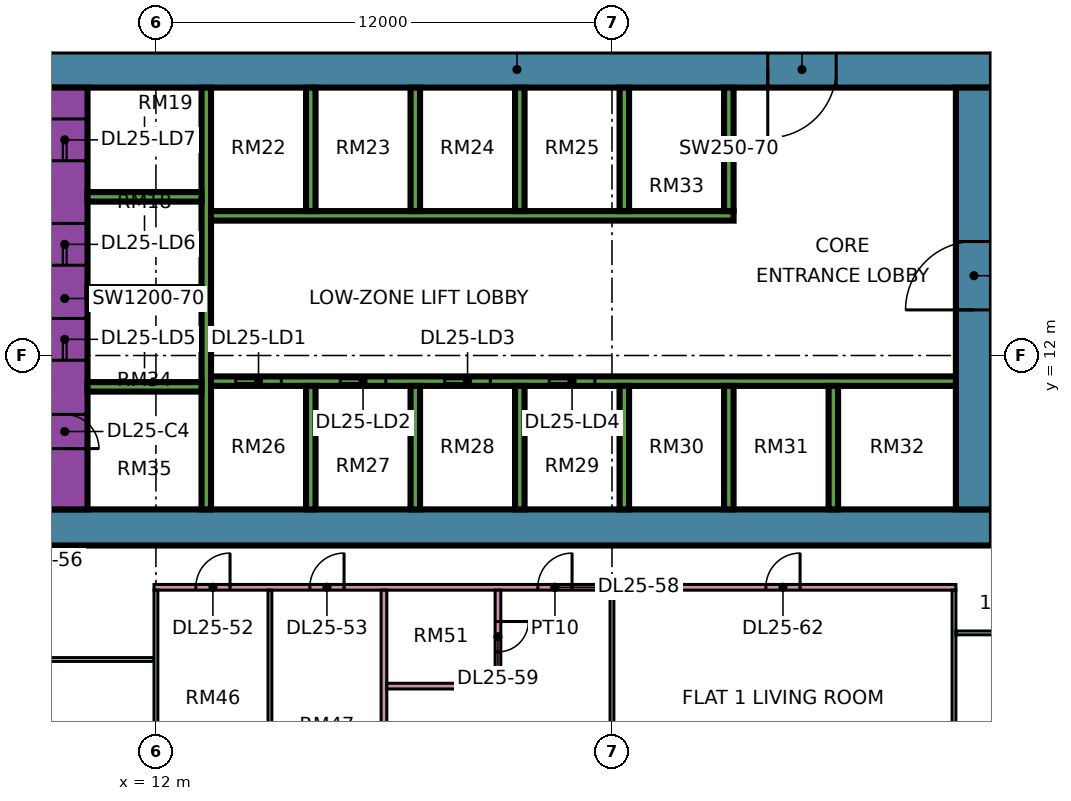
"""IFC4 building model, lengths in metres.
Left out: names, types, materials, properties, quantities, classifications, styles, units other than length and angle.
Written with IfcOpenShell. Run it as: python <this file> out.ifc"""

import sys

from ifc_helpers import new_model, si_unit, direction, frame, frame_2d, origin, place, context, subcontext, project, spatial, rectangle, extrude, element, fill, save


model = new_model("IFC4")
c1 = context("Model", 3, precision=1e-05, world=origin(), true_north=direction((0.0, 1.0)))
c2 = subcontext(c1, "Body", "Model", "MODEL_VIEW")
j1 = project(units=[si_unit("LENGTHUNIT", "METRE"), si_unit("PLANEANGLEUNIT", "RADIAN")], contexts=[c1])
p1 = place(None, origin())
s1 = spatial("IfcSite", under=j1, at=p1, CompositionType="ELEMENT")
p2 = place(p1, origin())
s2 = spatial("IfcBuilding", under=s1, at=p2, CompositionType="ELEMENT")
p3 = place(p2, frame((0.0, 0.0, 110.65)))
s3 = spatial("IfcBuildingStorey", under=s2, at=p3, CompositionType="ELEMENT", Elevation=110.65)
p4 = place(p3, frame((9.0, 7.475, 0.0), z_axis=(0.0, 0.0, 1.0), x_axis=(1.0, 0.0, 0.0)))
e1 = element("IfcWall", 1, at=p4, inside=s3, PredefinedType="SHEAR", context=c2, shape_type="SweptSolid", body=[
    extrude(rectangle(XDim=25.0, YDim=0.95, at=frame_2d((12.5, 0.0))), origin(), (0.0, 0.0, 1.0), 3.75),
])
p5 = place(p3, frame((9.0, 19.525, 0.0), z_axis=(0.0, 0.0, 1.0), x_axis=(1.0, 0.0, 0.0)))
e2 = element("IfcWall", 2, at=p5, inside=s3, PredefinedType="SHEAR", context=c2, shape_type="SweptSolid", body=[
    extrude(rectangle(XDim=25.0, YDim=0.95, at=frame_2d((12.5, 0.0))), origin(), (0.0, 0.0, 1.0), 3.75),
])
p6 = place(p5, frame((19.1, 0.0, 0.0)))
e3 = element("IfcOpeningElement", 3, at=p6, cuts=e2, PredefinedType="OPENING", context=c2, shape_type="SweptSolid", body=[
    extrude(rectangle(XDim=1.8, YDim=2.4, at=frame_2d((0.9, 1.2))), frame((0.0, 0.485, 0.0), z_axis=(0.0, -1.0, 0.0), x_axis=(1.0, 0.0, 0.0)), (0.0, 0.0, 1.0), 0.97),
])
p7 = place(p3, frame((9.6, 7.95, 0.0), z_axis=(0.0, 0.0, 1.0), x_axis=(0.0, 1.0, 0.0)))
e4 = element("IfcWall", 4, at=p7, inside=s3, PredefinedType="SHEAR", context=c2, shape_type="SweptSolid", body=[
    extrude(rectangle(XDim=11.1, YDim=1.2, at=frame_2d((5.55, 0.0))), origin(), (0.0, 0.0, 1.0), 3.75),
])
p8 = place(p7, frame((3.925, 0.0, 0.0)))
e5 = element("IfcOpeningElement", 5, at=p8, cuts=e4, PredefinedType="OPENING", context=c2, shape_type="SweptSolid", body=[
    extrude(rectangle(XDim=1.1, YDim=2.2, at=frame_2d((0.55, 1.1))), frame((0.0, 0.61, 0.0), z_axis=(0.0, -1.0, 0.0), x_axis=(1.0, 0.0, 0.0)), (0.0, 0.0, 1.0), 1.22),
])
p9 = place(p7, frame((6.425, 0.0, 0.0)))
e6 = element("IfcOpeningElement", 6, at=p9, cuts=e4, PredefinedType="OPENING", context=c2, shape_type="SweptSolid", body=[
    extrude(rectangle(XDim=1.1, YDim=2.2, at=frame_2d((0.55, 1.1))), frame((0.0, 0.61, 0.0), z_axis=(0.0, -1.0, 0.0), x_axis=(1.0, 0.0, 0.0)), (0.0, 0.0, 1.0), 1.22),
])
p10 = place(p7, frame((9.175, 0.0, 0.0)))
e7 = element("IfcOpeningElement", 7, at=p10, cuts=e4, PredefinedType="OPENING", context=c2, shape_type="SweptSolid", body=[
    extrude(rectangle(XDim=1.1, YDim=2.2, at=frame_2d((0.55, 1.1))), frame((0.0, 0.61, 0.0), z_axis=(0.0, -1.0, 0.0), x_axis=(1.0, 0.0, 0.0)), (0.0, 0.0, 1.0), 1.22),
])
p11 = place(p7, frame((1.6, 0.0, 0.0)))
e8 = element("IfcOpeningElement", 8, at=p11, cuts=e4, PredefinedType="OPENING", context=c2, shape_type="SweptSolid", body=[
    extrude(rectangle(XDim=0.9, YDim=2.1, at=frame_2d((0.45, 1.05))), frame((0.0, 0.61, 0.0), z_axis=(0.0, -1.0, 0.0), x_axis=(1.0, 0.0, 0.0)), (0.0, 0.0, 1.0), 1.22),
])
p12 = place(p3, frame((33.525, 7.95, 0.0), z_axis=(0.0, 0.0, 1.0), x_axis=(0.0, 1.0, 0.0)))
e9 = element("IfcWall", 9, at=p12, inside=s3, PredefinedType="SHEAR", context=c2, shape_type="SweptSolid", body=[
    extrude(rectangle(XDim=11.1, YDim=0.95, at=frame_2d((5.55, 0.0))), origin(), (0.0, 0.0, 1.0), 3.75),
])
p13 = place(p12, frame((5.25, 0.0, 0.0)))
e10 = element("IfcOpeningElement", 10, at=p13, cuts=e9, PredefinedType="OPENING", context=c2, shape_type="SweptSolid", body=[
    extrude(rectangle(XDim=1.8, YDim=2.4, at=frame_2d((0.9, 1.2))), frame((0.0, 0.485, 0.0), z_axis=(0.0, -1.0, 0.0), x_axis=(1.0, 0.0, 0.0)), (0.0, 0.0, 1.0), 0.97),
])
p14 = place(p3, frame((13.325, 7.95, 0.0), z_axis=(0.0, 0.0, 1.0), x_axis=(0.0, 1.0, 0.0)))
e11 = element("IfcWall", 11, at=p14, inside=s3, PredefinedType="SHEAR", context=c2, shape_type="SweptSolid", body=[
    extrude(rectangle(XDim=11.1, YDim=0.25, at=frame_2d((5.55, 0.0))), origin(), (0.0, 0.0, 1.0), 3.75),
])
p15 = place(p3, frame((13.45, 11.325, 0.0), z_axis=(0.0, 0.0, 1.0), x_axis=(1.0, 0.0, 0.0)))
e12 = element("IfcWall", 12, at=p15, inside=s3, PredefinedType="SHEAR", context=c2, shape_type="SweptSolid", body=[
    extrude(rectangle(XDim=19.6, YDim=0.25, at=frame_2d((9.8, 0.0))), origin(), (0.0, 0.0, 1.0), 3.75),
])
p16 = place(p15, frame((0.65, 0.0, 0.0)))
e13 = element("IfcOpeningElement", 13, at=p16, cuts=e12, PredefinedType="OPENING", context=c2, shape_type="SweptSolid", body=[
    extrude(rectangle(XDim=1.2, YDim=2.2, at=frame_2d((0.6, 1.1))), frame((0.0, 0.135, 0.0), z_axis=(0.0, -1.0, 0.0), x_axis=(1.0, 0.0, 0.0)), (0.0, 0.0, 1.0), 0.27),
])
p17 = place(p15, frame((3.4, 0.0, 0.0)))
e14 = element("IfcOpeningElement", 14, at=p17, cuts=e12, PredefinedType="OPENING", context=c2, shape_type="SweptSolid", body=[
    extrude(rectangle(XDim=1.2, YDim=2.2, at=frame_2d((0.6, 1.1))), frame((0.0, 0.135, 0.0), z_axis=(0.0, -1.0, 0.0), x_axis=(1.0, 0.0, 0.0)), (0.0, 0.0, 1.0), 0.27),
])
p18 = place(p15, frame((6.15, 0.0, 0.0)))
e15 = element("IfcOpeningElement", 15, at=p18, cuts=e12, PredefinedType="OPENING", context=c2, shape_type="SweptSolid", body=[
    extrude(rectangle(XDim=1.2, YDim=2.2, at=frame_2d((0.6, 1.1))), frame((0.0, 0.135, 0.0), z_axis=(0.0, -1.0, 0.0), x_axis=(1.0, 0.0, 0.0)), (0.0, 0.0, 1.0), 0.27),
])
p19 = place(p15, frame((8.9, 0.0, 0.0)))
e16 = element("IfcOpeningElement", 16, at=p19, cuts=e12, PredefinedType="OPENING", context=c2, shape_type="SweptSolid", body=[
    extrude(rectangle(XDim=1.2, YDim=2.2, at=frame_2d((0.6, 1.1))), frame((0.0, 0.135, 0.0), z_axis=(0.0, -1.0, 0.0), x_axis=(1.0, 0.0, 0.0)), (0.0, 0.0, 1.0), 0.27),
])
p20 = place(p3, frame((13.45, 15.675, 0.0), z_axis=(0.0, 0.0, 1.0), x_axis=(1.0, 0.0, 0.0)))
e17 = element("IfcWall", 17, at=p20, inside=s3, PredefinedType="SHEAR", context=c2, shape_type="SweptSolid", body=[
    extrude(rectangle(XDim=13.75, YDim=0.25, at=frame_2d((6.875, 0.0))), origin(), (0.0, 0.0, 1.0), 3.75),
])
for number, where, z_axis, x_axis in (
    (18, (10.2, 11.175, 0.0), (0.0, 0.0, 1.0), (1.0, 0.0, 0.0)),
    (19, (10.2, 13.675, 0.0), (0.0, 0.0, 1.0), (1.0, 0.0, 0.0)),
    (20, (10.2, 16.175, 0.0), (0.0, 0.0, 1.0), (1.0, 0.0, 0.0)),
):
    element("IfcWall", number, at=place(p3, frame(where, z_axis=z_axis, x_axis=x_axis)), inside=s3, PredefinedType="SHEAR", context=c2, shape_type="SweptSolid", body=[
        extrude(rectangle(XDim=3.0, YDim=0.25, at=frame_2d((1.5, 0.0))), origin(), (0.0, 0.0, 1.0), 3.75),
    ])
for number, where, z_axis, x_axis in (
    (21, (16.075, 7.95, 0.0), (0.0, 0.0, 1.0), (0.0, 1.0, 0.0)),
    (22, (18.825, 7.95, 0.0), (0.0, 0.0, 1.0), (0.0, 1.0, 0.0)),
    (23, (21.575, 7.95, 0.0), (0.0, 0.0, 1.0), (0.0, 1.0, 0.0)),
    (24, (24.325, 7.95, 0.0), (0.0, 0.0, 1.0), (0.0, 1.0, 0.0)),
    (25, (27.075, 7.95, 0.0), (0.0, 0.0, 1.0), (0.0, 1.0, 0.0)),
    (26, (29.825, 7.95, 0.0), (0.0, 0.0, 1.0), (0.0, 1.0, 0.0)),
    (27, (16.075, 15.8, 0.0), (0.0, 0.0, 1.0), (0.0, 1.0, 0.0)),
    (28, (18.825, 15.8, 0.0), (0.0, 0.0, 1.0), (0.0, 1.0, 0.0)),
    (29, (21.575, 15.8, 0.0), (0.0, 0.0, 1.0), (0.0, 1.0, 0.0)),
    (30, (24.325, 15.8, 0.0), (0.0, 0.0, 1.0), (0.0, 1.0, 0.0)),
    (31, (27.075, 15.8, 0.0), (0.0, 0.0, 1.0), (0.0, 1.0, 0.0)),
):
    element("IfcWall", number, at=place(p3, frame(where, z_axis=z_axis, x_axis=x_axis)), inside=s3, PredefinedType="SHEAR", context=c2, shape_type="SweptSolid", body=[
        extrude(rectangle(XDim=3.25, YDim=0.25, at=frame_2d((1.625, 0.0))), origin(), (0.0, 0.0, 1.0), 3.75),
    ])
p21 = place(p3, frame((-1.447, 12.553, 0.0), z_axis=(0.0, 0.0, 1.0), x_axis=(0.707106781187, -0.707106781187, 0.0)))
e32 = element("IfcWall", 32, at=p21, inside=s3, PredefinedType="SOLIDWALL", context=c2, shape_type="SweptSolid", body=[
    extrude(rectangle(XDim=19.799, YDim=0.15, at=frame_2d((9.899, 0.0))), origin(), (0.0, 0.0, 1.0), 3.35),
])
p22 = place(p21, frame((2.212, 0.0, 0.45)))
e33 = element("IfcOpeningElement", 33, at=p22, cuts=e32, PredefinedType="OPENING", context=c2, shape_type="SweptSolid", body=[
    extrude(rectangle(XDim=3.0, YDim=2.4, at=frame_2d((1.5, 1.2))), frame((0.0, 0.085, 0.0), z_axis=(0.0, -1.0, 0.0), x_axis=(1.0, 0.0, 0.0)), (0.0, 0.0, 1.0), 0.17),
])
p23 = place(p21, frame((10.216, 0.0, 0.45)))
e34 = element("IfcOpeningElement", 34, at=p23, cuts=e32, PredefinedType="OPENING", context=c2, shape_type="SweptSolid", body=[
    extrude(rectangle(XDim=3.0, YDim=2.4, at=frame_2d((1.5, 1.2))), frame((0.0, 0.085, 0.0), z_axis=(0.0, -1.0, 0.0), x_axis=(1.0, 0.0, 0.0)), (0.0, 0.0, 1.0), 0.17),
])
p24 = place(p3, frame((9.05, 4.0, 0.0), z_axis=(0.0, 0.0, 1.0), x_axis=(1.0, 0.0, 0.0)))
e35 = element("IfcWall", 35, at=p24, inside=s3, PredefinedType="PARTITIONING", context=c2, shape_type="SweptSolid", body=[
    extrude(rectangle(XDim=2.9, YDim=0.1, at=frame_2d((1.45, 0.0))), origin(), (0.0, 0.0, 1.0), 3.35),
])
p25 = place(p3, frame((11.95, 5.9, 0.0), z_axis=(0.0, 0.0, 1.0), x_axis=(1.0, 0.0, 0.0)))
e36 = element("IfcWall", 36, at=p25, inside=s3, PredefinedType="PARTITIONING", context=c2, shape_type="SweptSolid", body=[
    extrude(rectangle(XDim=21.1, YDim=0.15, at=frame_2d((10.55, 0.0))), origin(), (0.0, 0.0, 1.0), 3.35),
])
p26 = place(p25, frame((1.1, 0.0, 0.0)))
e37 = element("IfcOpeningElement", 37, at=p26, cuts=e36, PredefinedType="OPENING", context=c2, shape_type="SweptSolid", body=[
    extrude(rectangle(XDim=0.9, YDim=2.1, at=frame_2d((0.45, 1.05))), frame((0.0, 0.085, 0.0), z_axis=(0.0, -1.0, 0.0), x_axis=(1.0, 0.0, 0.0)), (0.0, 0.0, 1.0), 0.17),
])
p27 = place(p25, frame((4.1, 0.0, 0.0)))
e38 = element("IfcOpeningElement", 38, at=p27, cuts=e36, PredefinedType="OPENING", context=c2, shape_type="SweptSolid", body=[
    extrude(rectangle(XDim=0.9, YDim=2.1, at=frame_2d((0.45, 1.05))), frame((0.0, 0.085, 0.0), z_axis=(0.0, -1.0, 0.0), x_axis=(1.0, 0.0, 0.0)), (0.0, 0.0, 1.0), 0.17),
])
p28 = place(p25, frame((10.1, 0.0, 0.0)))
e39 = element("IfcOpeningElement", 39, at=p28, cuts=e36, PredefinedType="OPENING", context=c2, shape_type="SweptSolid", body=[
    extrude(rectangle(XDim=0.9, YDim=2.1, at=frame_2d((0.45, 1.05))), frame((0.0, 0.085, 0.0), z_axis=(0.0, -1.0, 0.0), x_axis=(1.0, 0.0, 0.0)), (0.0, 0.0, 1.0), 0.17),
])
p29 = place(p25, frame((16.1, 0.0, 0.0)))
e40 = element("IfcOpeningElement", 40, at=p29, cuts=e36, PredefinedType="OPENING", context=c2, shape_type="SweptSolid", body=[
    extrude(rectangle(XDim=0.9, YDim=2.1, at=frame_2d((0.45, 1.05))), frame((0.0, 0.085, 0.0), z_axis=(0.0, -1.0, 0.0), x_axis=(1.0, 0.0, 0.0)), (0.0, 0.0, 1.0), 0.17),
])
p30 = place(p3, frame((12.0, -0.788, 0.0), z_axis=(0.0, 0.0, 1.0), x_axis=(0.0, 1.0, 0.0)))
e41 = element("IfcWall", 41, at=p30, inside=s3, PredefinedType="PARTITIONING", context=c2, shape_type="SweptSolid", body=[
    extrude(rectangle(XDim=6.613, YDim=0.1, at=frame_2d((3.306, 0.0))), origin(), (0.0, 0.0, 1.0), 3.35),
])
p31 = place(p3, frame((15.0, -1.351, 0.0), z_axis=(0.0, 0.0, 1.0), x_axis=(0.0, 1.0, 0.0)))
e42 = element("IfcWall", 42, at=p31, inside=s3, PredefinedType="PARTITIONING", context=c2, shape_type="SweptSolid", body=[
    extrude(rectangle(XDim=7.176, YDim=0.1, at=frame_2d((3.588, 0.0))), origin(), (0.0, 0.0, 1.0), 3.35),
])
p32 = place(p3, frame((18.0, -1.351, 0.0), z_axis=(0.0, 0.0, 1.0), x_axis=(0.0, 1.0, 0.0)))
e43 = element("IfcWall", 43, at=p32, inside=s3, PredefinedType="PARTITIONING", context=c2, shape_type="SweptSolid", body=[
    extrude(rectangle(XDim=7.176, YDim=0.15, at=frame_2d((3.588, 0.0))), origin(), (0.0, 0.0, 1.0), 3.35),
])
p33 = place(p3, frame((18.075, 3.3, 0.0), z_axis=(0.0, 0.0, 1.0), x_axis=(1.0, 0.0, 0.0)))
e44 = element("IfcWall", 44, at=p33, inside=s3, PredefinedType="PARTITIONING", context=c2, shape_type="SweptSolid", body=[
    extrude(rectangle(XDim=3.0, YDim=0.15, at=frame_2d((1.5, 0.0))), origin(), (0.0, 0.0, 1.0), 3.35),
])
p34 = place(p3, frame((21.0, 3.375, 0.0), z_axis=(0.0, 0.0, 1.0), x_axis=(0.0, 1.0, 0.0)))
e45 = element("IfcWall", 45, at=p34, inside=s3, PredefinedType="PARTITIONING", context=c2, shape_type="SweptSolid", body=[
    extrude(rectangle(XDim=2.45, YDim=0.15, at=frame_2d((1.225, 0.0))), origin(), (0.0, 0.0, 1.0), 3.35),
])
p35 = place(p34, frame((0.825, 0.0, 0.0)))
e46 = element("IfcOpeningElement", 46, at=p35, cuts=e45, PredefinedType="OPENING", context=c2, shape_type="SweptSolid", body=[
    extrude(rectangle(XDim=0.8, YDim=2.1, at=frame_2d((0.4, 1.05))), frame((0.0, 0.085, 0.0), z_axis=(0.0, -1.0, 0.0), x_axis=(1.0, 0.0, 0.0)), (0.0, 0.0, 1.0), 0.17),
])
p36 = place(p3, frame((24.0, 0.0, 0.0), z_axis=(0.0, 0.0, 1.0), x_axis=(0.0, 1.0, 0.0)))
e47 = element("IfcWall", 47, at=p36, inside=s3, PredefinedType="PARTITIONING", context=c2, shape_type="SweptSolid", body=[
    extrude(rectangle(XDim=5.825, YDim=0.1, at=frame_2d((2.913, 0.0))), origin(), (0.0, 0.0, 1.0), 3.35),
])
p37 = place(p3, frame((33.0, 0.074, 0.0), z_axis=(0.0, 0.0, 1.0), x_axis=(0.0, 1.0, 0.0)))
e48 = element("IfcWall", 48, at=p37, inside=s3, PredefinedType="PARTITIONING", context=c2, shape_type="SweptSolid", body=[
    extrude(rectangle(XDim=5.751, YDim=0.1, at=frame_2d((2.875, 0.0))), origin(), (0.0, 0.0, 1.0), 3.35),
])
p38 = place(p3, frame((33.05, 4.7, 0.0), z_axis=(0.0, 0.0, 1.0), x_axis=(1.0, 0.0, 0.0)))
e49 = element("IfcWall", 49, at=p38, inside=s3, PredefinedType="PARTITIONING", context=c2, shape_type="SweptSolid", body=[
    extrude(rectangle(XDim=14.85, YDim=0.1, at=frame_2d((7.425, 0.0))), origin(), (0.0, 0.0, 1.0), 3.35),
])
p39 = place(p38, frame((10.0, 0.0, 0.0)))
e50 = element("IfcOpeningElement", 50, at=p39, cuts=e49, PredefinedType="OPENING", context=c2, shape_type="SweptSolid", body=[
    extrude(rectangle(XDim=0.9, YDim=2.1, at=frame_2d((0.45, 1.05))), frame((0.0, 0.06, 0.0), z_axis=(0.0, -1.0, 0.0), x_axis=(1.0, 0.0, 0.0)), (0.0, 0.0, 1.0), 0.12),
])
p40 = place(p38, frame((13.0, 0.0, 0.0)))
e51 = element("IfcOpeningElement", 51, at=p40, cuts=e49, PredefinedType="OPENING", context=c2, shape_type="SweptSolid", body=[
    extrude(rectangle(XDim=0.9, YDim=2.1, at=frame_2d((0.45, 1.05))), frame((0.0, 0.06, 0.0), z_axis=(0.0, -1.0, 0.0), x_axis=(1.0, 0.0, 0.0)), (0.0, 0.0, 1.0), 0.12),
])
p41 = place(p38, frame((4.0, 0.0, 0.0)))
e52 = element("IfcOpeningElement", 52, at=p41, cuts=e49, PredefinedType="OPENING", context=c2, shape_type="SweptSolid", body=[
    extrude(rectangle(XDim=0.9, YDim=2.1, at=frame_2d((0.45, 1.05))), frame((0.0, 0.06, 0.0), z_axis=(0.0, -1.0, 0.0), x_axis=(1.0, 0.0, 0.0)), (0.0, 0.0, 1.0), 0.12),
])
p42 = place(p16, origin())
e53 = element("IfcDoor", 53, at=p42, inside=s3, OperationType="DOUBLE_DOOR_SLIDING", PredefinedType="DOOR", context=c2, shape_type="SweptSolid", body=[
    extrude(rectangle(XDim=1.2, YDim=2.2, at=frame_2d((0.6, 1.1))), frame((0.0, 0.025, 0.0), z_axis=(0.0, -1.0, 0.0), x_axis=(1.0, 0.0, 0.0)), (0.0, 0.0, 1.0), 0.05),
])
fill(e13, e53)
p43 = place(p17, origin())
e54 = element("IfcDoor", 54, at=p43, inside=s3, OperationType="DOUBLE_DOOR_SLIDING", PredefinedType="DOOR", context=c2, shape_type="SweptSolid", body=[
    extrude(rectangle(XDim=1.2, YDim=2.2, at=frame_2d((0.6, 1.1))), frame((0.0, 0.025, 0.0), z_axis=(0.0, -1.0, 0.0), x_axis=(1.0, 0.0, 0.0)), (0.0, 0.0, 1.0), 0.05),
])
fill(e14, e54)
p44 = place(p18, origin())
e55 = element("IfcDoor", 55, at=p44, inside=s3, OperationType="DOUBLE_DOOR_SLIDING", PredefinedType="DOOR", context=c2, shape_type="SweptSolid", body=[
    extrude(rectangle(XDim=1.2, YDim=2.2, at=frame_2d((0.6, 1.1))), frame((0.0, 0.025, 0.0), z_axis=(0.0, -1.0, 0.0), x_axis=(1.0, 0.0, 0.0)), (0.0, 0.0, 1.0), 0.05),
])
fill(e15, e55)
p45 = place(p19, origin())
e56 = element("IfcDoor", 56, at=p45, inside=s3, OperationType="DOUBLE_DOOR_SLIDING", PredefinedType="DOOR", context=c2, shape_type="SweptSolid", body=[
    extrude(rectangle(XDim=1.2, YDim=2.2, at=frame_2d((0.6, 1.1))), frame((0.0, 0.025, 0.0), z_axis=(0.0, -1.0, 0.0), x_axis=(1.0, 0.0, 0.0)), (0.0, 0.0, 1.0), 0.05),
])
fill(e16, e56)
p46 = place(p8, origin())
e57 = element("IfcDoor", 57, at=p46, inside=s3, OperationType="DOUBLE_DOOR_SLIDING", PredefinedType="DOOR", context=c2, shape_type="SweptSolid", body=[
    extrude(rectangle(XDim=1.1, YDim=2.2, at=frame_2d((0.55, 1.1))), frame((0.0, 0.025, 0.0), z_axis=(0.0, -1.0, 0.0), x_axis=(1.0, 0.0, 0.0)), (0.0, 0.0, 1.0), 0.05),
])
fill(e5, e57)
p47 = place(p9, origin())
e58 = element("IfcDoor", 58, at=p47, inside=s3, OperationType="DOUBLE_DOOR_SLIDING", PredefinedType="DOOR", context=c2, shape_type="SweptSolid", body=[
    extrude(rectangle(XDim=1.1, YDim=2.2, at=frame_2d((0.55, 1.1))), frame((0.0, 0.025, 0.0), z_axis=(0.0, -1.0, 0.0), x_axis=(1.0, 0.0, 0.0)), (0.0, 0.0, 1.0), 0.05),
])
fill(e6, e58)
p48 = place(p10, origin())
e59 = element("IfcDoor", 59, at=p48, inside=s3, OperationType="DOUBLE_DOOR_SLIDING", PredefinedType="DOOR", context=c2, shape_type="SweptSolid", body=[
    extrude(rectangle(XDim=1.1, YDim=2.2, at=frame_2d((0.55, 1.1))), frame((0.0, 0.025, 0.0), z_axis=(0.0, -1.0, 0.0), x_axis=(1.0, 0.0, 0.0)), (0.0, 0.0, 1.0), 0.05),
])
fill(e7, e59)
p49 = place(p13, origin())
e60 = element("IfcDoor", 60, at=p49, inside=s3, OperationType="DOUBLE_DOOR_SINGLE_SWING", PredefinedType="DOOR", context=c2, shape_type="SweptSolid", body=[
    extrude(rectangle(XDim=1.8, YDim=2.4, at=frame_2d((0.9, 1.2))), frame((0.0, 0.025, 0.0), z_axis=(0.0, -1.0, 0.0), x_axis=(1.0, 0.0, 0.0)), (0.0, 0.0, 1.0), 0.05),
])
fill(e10, e60)
p50 = place(p6, frame((1.8, 0.0, 0.0), z_axis=(0.0, 0.0, 1.0), x_axis=(-1.0, 0.0, 0.0)))
e61 = element("IfcDoor", 61, at=p50, inside=s3, OperationType="DOUBLE_DOOR_SINGLE_SWING", PredefinedType="DOOR", context=c2, shape_type="SweptSolid", body=[
    extrude(rectangle(XDim=1.8, YDim=2.4, at=frame_2d((0.9, 1.2))), frame((0.0, 0.025, 0.0), z_axis=(0.0, -1.0, 0.0), x_axis=(1.0, 0.0, 0.0)), (0.0, 0.0, 1.0), 0.05),
])
fill(e3, e61)
p51 = place(p11, frame((0.9, 0.0, 0.0), z_axis=(0.0, 0.0, 1.0), x_axis=(-1.0, 0.0, 0.0)))
e62 = element("IfcDoor", 62, at=p51, inside=s3, OperationType="SINGLE_SWING_LEFT", PredefinedType="DOOR", context=c2, shape_type="SweptSolid", body=[
    extrude(rectangle(XDim=0.9, YDim=2.1, at=frame_2d((0.45, 1.05))), frame((0.0, 0.025, 0.0), z_axis=(0.0, -1.0, 0.0), x_axis=(1.0, 0.0, 0.0)), (0.0, 0.0, 1.0), 0.05),
])
fill(e8, e62)
p52 = place(p26, frame((0.9, 0.0, 0.0), z_axis=(0.0, 0.0, 1.0), x_axis=(-1.0, 0.0, 0.0)))
e63 = element("IfcDoor", 63, at=p52, inside=s3, OperationType="SINGLE_SWING_RIGHT", PredefinedType="DOOR", context=c2, shape_type="SweptSolid", body=[
    extrude(rectangle(XDim=0.9, YDim=2.1, at=frame_2d((0.45, 1.05))), frame((0.0, 0.025, 0.0), z_axis=(0.0, -1.0, 0.0), x_axis=(1.0, 0.0, 0.0)), (0.0, 0.0, 1.0), 0.05),
])
fill(e37, e63)
p53 = place(p27, frame((0.9, 0.0, 0.0), z_axis=(0.0, 0.0, 1.0), x_axis=(-1.0, 0.0, 0.0)))
e64 = element("IfcDoor", 64, at=p53, inside=s3, OperationType="SINGLE_SWING_RIGHT", PredefinedType="DOOR", context=c2, shape_type="SweptSolid", body=[
    extrude(rectangle(XDim=0.9, YDim=2.1, at=frame_2d((0.45, 1.05))), frame((0.0, 0.025, 0.0), z_axis=(0.0, -1.0, 0.0), x_axis=(1.0, 0.0, 0.0)), (0.0, 0.0, 1.0), 0.05),
])
fill(e38, e64)
p54 = place(p28, frame((0.9, 0.0, 0.0), z_axis=(0.0, 0.0, 1.0), x_axis=(-1.0, 0.0, 0.0)))
e65 = element("IfcDoor", 65, at=p54, inside=s3, OperationType="SINGLE_SWING_RIGHT", PredefinedType="DOOR", context=c2, shape_type="SweptSolid", body=[
    extrude(rectangle(XDim=0.9, YDim=2.1, at=frame_2d((0.45, 1.05))), frame((0.0, 0.025, 0.0), z_axis=(0.0, -1.0, 0.0), x_axis=(1.0, 0.0, 0.0)), (0.0, 0.0, 1.0), 0.05),
])
fill(e39, e65)
p55 = place(p35, origin())
e66 = element("IfcDoor", 66, at=p55, inside=s3, OperationType="SINGLE_SWING_RIGHT", PredefinedType="DOOR", context=c2, shape_type="SweptSolid", body=[
    extrude(rectangle(XDim=0.8, YDim=2.1, at=frame_2d((0.4, 1.05))), frame((0.0, 0.025, 0.0), z_axis=(0.0, -1.0, 0.0), x_axis=(1.0, 0.0, 0.0)), (0.0, 0.0, 1.0), 0.05),
])
fill(e46, e66)
p56 = place(p29, frame((0.9, 0.0, 0.0), z_axis=(0.0, 0.0, 1.0), x_axis=(-1.0, 0.0, 0.0)))
e67 = element("IfcDoor", 67, at=p56, inside=s3, OperationType="SINGLE_SWING_RIGHT", PredefinedType="DOOR", context=c2, shape_type="SweptSolid", body=[
    extrude(rectangle(XDim=0.9, YDim=2.1, at=frame_2d((0.45, 1.05))), frame((0.0, 0.025, 0.0), z_axis=(0.0, -1.0, 0.0), x_axis=(1.0, 0.0, 0.0)), (0.0, 0.0, 1.0), 0.05),
])
fill(e40, e67)
save(model, sys.argv[1])
